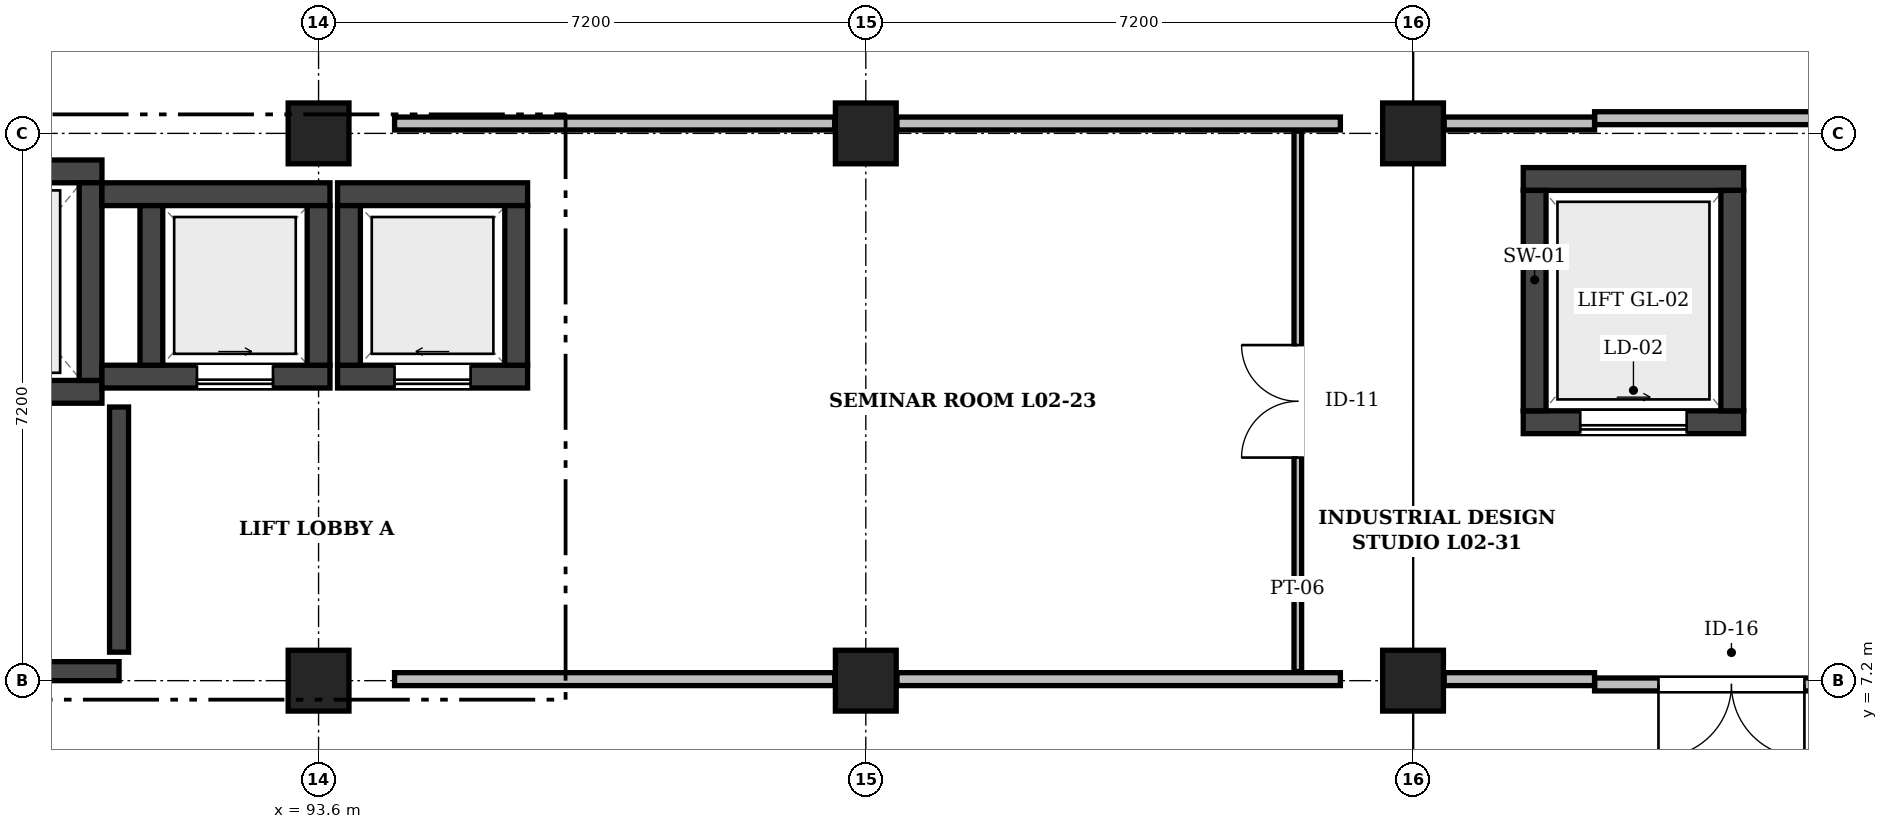
"""IFC4 building model, lengths in metres.
Left out: names, types, materials, properties, quantities, classifications, styles, units other than length and angle.
Written with IfcOpenShell. Run it as: python <this file> out.ifc"""

import sys

from ifc_helpers import new_model, si_unit, direction, frame, frame_2d, origin, origin_2d, place, context, subcontext, project, spatial, rectangle, extrude, element, fill, save


model = new_model("IFC4")
c1 = context("Model", 3, precision=1e-05, world=origin(), true_north=direction((0.0, 1.0)))
c2 = subcontext(c1, "Body", "Model", "MODEL_VIEW")
j1 = project(units=[si_unit("LENGTHUNIT", "METRE"), si_unit("PLANEANGLEUNIT", "RADIAN")], contexts=[c1])
p1 = place(None, origin())
s1 = spatial("IfcSite", under=j1, at=p1, CompositionType="ELEMENT")
p2 = place(p1, origin())
s2 = spatial("IfcBuilding", under=s1, at=p2, CompositionType="ELEMENT")
p3 = place(p2, frame((0.0, 0.0, 9.6)))
s3 = spatial("IfcBuildingStorey", under=s2, at=p3, CompositionType="ELEMENT", Elevation=9.6)
for number, where, z_axis, x_axis in (
    (1, (93.6, 7.2, 0.0), (0.0, 0.0, 1.0), (1.0, 0.0, 0.0)),
    (2, (93.6, 14.4, 0.0), (0.0, 0.0, 1.0), (1.0, 0.0, 0.0)),
    (3, (100.8, 7.2, 0.0), (0.0, 0.0, 1.0), (1.0, 0.0, 0.0)),
    (4, (100.8, 14.4, 0.0), (0.0, 0.0, 1.0), (1.0, 0.0, 0.0)),
    (5, (108.0, 7.2, 0.0), (0.0, 0.0, 1.0), (1.0, 0.0, 0.0)),
    (6, (108.0, 14.4, 0.0), (0.0, 0.0, 1.0), (1.0, 0.0, 0.0)),
):
    element("IfcColumn", number, at=place(p3, frame(where, z_axis=z_axis, x_axis=x_axis)), inside=s3, PredefinedType="COLUMN", context=c2, shape_type="SweptSolid", body=[
        extrude(rectangle(XDim=0.8, YDim=0.8, at=origin_2d()), origin(), (0.0, 0.0, 1.0), 4.8),
    ])
p4 = place(p3, frame((88.05, 11.0, 0.0), z_axis=(0.0, 0.0, 1.0), x_axis=(1.0, 0.0, 0.0)))
e7 = element("IfcWall", 7, at=p4, inside=s3, PredefinedType="SHEAR", context=c2, shape_type="SweptSolid", body=[
    extrude(rectangle(XDim=2.7, YDim=0.3, at=frame_2d((1.35, 0.0))), origin(), (0.0, 0.0, 1.0), 4.55),
])
p5 = place(p4, frame((0.85, 0.0, 0.0)))
e8 = element("IfcOpeningElement", 8, at=p5, cuts=e7, PredefinedType="OPENING", context=c2, shape_type="SweptSolid", body=[
    extrude(rectangle(XDim=1.0, YDim=2.1, at=frame_2d((0.5, 1.05))), frame((0.0, 0.162, 0.0), z_axis=(0.0, -1.0, 0.0), x_axis=(1.0, 0.0, 0.0)), (0.0, 0.0, 1.0), 0.324),
])
p6 = place(p3, frame((88.05, 13.9, 0.0), z_axis=(0.0, 0.0, 1.0), x_axis=(1.0, 0.0, 0.0)))
e9 = element("IfcWall", 9, at=p6, inside=s3, PredefinedType="SHEAR", context=c2, shape_type="SweptSolid", body=[
    extrude(rectangle(XDim=2.7, YDim=0.3, at=frame_2d((1.35, 0.0))), origin(), (0.0, 0.0, 1.0), 4.55),
])
p7 = place(p3, frame((90.6, 11.15, 0.0), z_axis=(0.0, 0.0, 1.0), x_axis=(0.0, 1.0, 0.0)))
e10 = element("IfcWall", 10, at=p7, inside=s3, PredefinedType="SHEAR", context=c2, shape_type="SweptSolid", body=[
    extrude(rectangle(XDim=2.6, YDim=0.3, at=frame_2d((1.3, 0.0))), origin(), (0.0, 0.0, 1.0), 4.55),
])
p8 = place(p3, frame((90.75, 11.2, 0.0), z_axis=(0.0, 0.0, 1.0), x_axis=(1.0, 0.0, 0.0)))
e11 = element("IfcWall", 11, at=p8, inside=s3, PredefinedType="SHEAR", context=c2, shape_type="SweptSolid", body=[
    extrude(rectangle(XDim=3.0, YDim=0.3, at=frame_2d((1.5, 0.0))), origin(), (0.0, 0.0, 1.0), 4.55),
])
p9 = place(p8, frame((1.25, 0.0, 0.0)))
e12 = element("IfcOpeningElement", 12, at=p9, cuts=e11, PredefinedType="OPENING", context=c2, shape_type="SweptSolid", body=[
    extrude(rectangle(XDim=1.0, YDim=2.1, at=frame_2d((0.5, 1.05))), frame((0.0, 0.162, 0.0), z_axis=(0.0, -1.0, 0.0), x_axis=(1.0, 0.0, 0.0)), (0.0, 0.0, 1.0), 0.324),
])
p10 = place(p3, frame((90.75, 13.6, 0.0), z_axis=(0.0, 0.0, 1.0), x_axis=(1.0, 0.0, 0.0)))
e13 = element("IfcWall", 13, at=p10, inside=s3, PredefinedType="SHEAR", context=c2, shape_type="SweptSolid", body=[
    extrude(rectangle(XDim=3.0, YDim=0.3, at=frame_2d((1.5, 0.0))), origin(), (0.0, 0.0, 1.0), 4.55),
])
for number, where, z_axis, x_axis in (
    (14, (91.4, 11.35, 0.0), (0.0, 0.0, 1.0), (0.0, 1.0, 0.0)),
    (15, (93.6, 11.35, 0.0), (0.0, 0.0, 1.0), (0.0, 1.0, 0.0)),
):
    element("IfcWall", number, at=place(p3, frame(where, z_axis=z_axis, x_axis=x_axis)), inside=s3, PredefinedType="SHEAR", context=c2, shape_type="SweptSolid", body=[
        extrude(rectangle(XDim=2.1, YDim=0.3, at=frame_2d((1.05, 0.0))), origin(), (0.0, 0.0, 1.0), 4.55),
    ])
p11 = place(p3, frame((93.85, 11.2, 0.0), z_axis=(0.0, 0.0, 1.0), x_axis=(1.0, 0.0, 0.0)))
e16 = element("IfcWall", 16, at=p11, inside=s3, PredefinedType="SHEAR", context=c2, shape_type="SweptSolid", body=[
    extrude(rectangle(XDim=2.5, YDim=0.3, at=frame_2d((1.25, 0.0))), origin(), (0.0, 0.0, 1.0), 4.55),
])
p12 = place(p11, frame((0.75, 0.0, 0.0)))
e17 = element("IfcOpeningElement", 17, at=p12, cuts=e16, PredefinedType="OPENING", context=c2, shape_type="SweptSolid", body=[
    extrude(rectangle(XDim=1.0, YDim=2.1, at=frame_2d((0.5, 1.05))), frame((0.0, 0.162, 0.0), z_axis=(0.0, -1.0, 0.0), x_axis=(1.0, 0.0, 0.0)), (0.0, 0.0, 1.0), 0.324),
])
p13 = place(p3, frame((93.85, 13.6, 0.0), z_axis=(0.0, 0.0, 1.0), x_axis=(1.0, 0.0, 0.0)))
e18 = element("IfcWall", 18, at=p13, inside=s3, PredefinedType="SHEAR", context=c2, shape_type="SweptSolid", body=[
    extrude(rectangle(XDim=2.5, YDim=0.3, at=frame_2d((1.25, 0.0))), origin(), (0.0, 0.0, 1.0), 4.55),
])
for number, where, z_axis, x_axis in (
    (19, (94.0, 11.35, 0.0), (0.0, 0.0, 1.0), (0.0, 1.0, 0.0)),
    (20, (96.2, 11.35, 0.0), (0.0, 0.0, 1.0), (0.0, 1.0, 0.0)),
):
    element("IfcWall", number, at=place(p3, frame(where, z_axis=z_axis, x_axis=x_axis)), inside=s3, PredefinedType="SHEAR", context=c2, shape_type="SweptSolid", body=[
        extrude(rectangle(XDim=2.1, YDim=0.3, at=frame_2d((1.05, 0.0))), origin(), (0.0, 0.0, 1.0), 4.55),
    ])
p14 = place(p3, frame((109.45, 10.6, 0.0), z_axis=(0.0, 0.0, 1.0), x_axis=(1.0, 0.0, 0.0)))
e21 = element("IfcWall", 21, at=p14, inside=s3, PredefinedType="SHEAR", context=c2, shape_type="SweptSolid", body=[
    extrude(rectangle(XDim=2.9, YDim=0.3, at=frame_2d((1.45, 0.0))), origin(), (0.0, 0.0, 1.0), 4.55),
])
p15 = place(p14, frame((0.75, 0.0, 0.0)))
e22 = element("IfcOpeningElement", 22, at=p15, cuts=e21, PredefinedType="OPENING", context=c2, shape_type="SweptSolid", body=[
    extrude(rectangle(XDim=1.4, YDim=2.2, at=frame_2d((0.7, 1.1))), frame((0.0, 0.162, 0.0), z_axis=(0.0, -1.0, 0.0), x_axis=(1.0, 0.0, 0.0)), (0.0, 0.0, 1.0), 0.324),
])
p16 = place(p3, frame((109.45, 13.8, 0.0), z_axis=(0.0, 0.0, 1.0), x_axis=(1.0, 0.0, 0.0)))
e23 = element("IfcWall", 23, at=p16, inside=s3, PredefinedType="SHEAR", context=c2, shape_type="SweptSolid", body=[
    extrude(rectangle(XDim=2.9, YDim=0.3, at=frame_2d((1.45, 0.0))), origin(), (0.0, 0.0, 1.0), 4.55),
])
for number, where, z_axis, x_axis in (
    (24, (109.6, 10.75, 0.0), (0.0, 0.0, 1.0), (0.0, 1.0, 0.0)),
    (25, (112.2, 10.75, 0.0), (0.0, 0.0, 1.0), (0.0, 1.0, 0.0)),
):
    element("IfcWall", number, at=place(p3, frame(where, z_axis=z_axis, x_axis=x_axis)), inside=s3, PredefinedType="SHEAR", context=c2, shape_type="SweptSolid", body=[
        extrude(rectangle(XDim=2.9, YDim=0.3, at=frame_2d((1.45, 0.0))), origin(), (0.0, 0.0, 1.0), 4.55),
    ])
p17 = place(p3, frame((86.8, 7.325, 0.0), z_axis=(0.0, 0.0, 1.0), x_axis=(1.0, 0.0, 0.0)))
e26 = element("IfcWall", 26, at=p17, inside=s3, PredefinedType="SHEAR", context=c2, shape_type="SweptSolid", body=[
    extrude(rectangle(XDim=4.175, YDim=0.25, at=frame_2d((2.087, 0.0))), origin(), (0.0, 0.0, 1.0), 4.55),
])
p18 = place(p17, frame((1.675, 0.0, 0.0)))
e27 = element("IfcOpeningElement", 27, at=p18, cuts=e26, PredefinedType="OPENING", context=c2, shape_type="SweptSolid", body=[
    extrude(rectangle(XDim=1.15, YDim=2.15, at=frame_2d((0.575, 1.075))), frame((0.0, 0.137, 0.0), z_axis=(0.0, -1.0, 0.0), x_axis=(1.0, 0.0, 0.0)), (0.0, 0.0, 1.0), 0.274),
])
p19 = place(p3, frame((90.975, 7.575, 0.0), z_axis=(0.0, 0.0, 1.0), x_axis=(0.0, 1.0, 0.0)))
e28 = element("IfcWall", 28, at=p19, inside=s3, PredefinedType="SHEAR", context=c2, shape_type="SweptSolid", body=[
    extrude(rectangle(XDim=3.225, YDim=0.25, at=frame_2d((1.613, 0.0))), origin(), (0.0, 0.0, 1.0), 4.55),
])
p20 = place(p3, frame((101.21, 14.53, 0.0), z_axis=(0.0, 0.0, 1.0), x_axis=(1.0, 0.0, 0.0)))
e29 = element("IfcWall", 29, at=p20, inside=s3, PredefinedType="PARTITIONING", context=c2, shape_type="SweptSolid", body=[
    extrude(rectangle(XDim=5.834, YDim=0.17, at=frame_2d((2.917, 0.0))), origin(), (0.0, 0.0, 1.0), 3.93),
])
p21 = place(p3, frame((94.6, 14.53, 0.0), z_axis=(0.0, 0.0, 1.0), x_axis=(1.0, 0.0, 0.0)))
e30 = element("IfcWall", 30, at=p21, inside=s3, PredefinedType="PARTITIONING", context=c2, shape_type="SweptSolid", body=[
    extrude(rectangle(XDim=5.79, YDim=0.17, at=frame_2d((2.895, 0.0))), origin(), (0.0, 0.0, 1.0), 3.93),
])
p22 = place(p3, frame((110.388, 14.6, 0.0), z_axis=(0.0, 0.0, 1.0), x_axis=(1.0, 0.0, 0.0)))
e31 = element("IfcWall", 31, at=p22, inside=s3, PredefinedType="PARTITIONING", context=c2, shape_type="SweptSolid", body=[
    extrude(rectangle(XDim=4.402, YDim=0.17, at=frame_2d((2.201, 0.0))), origin(), (0.0, 0.0, 1.0), 3.93),
])
p23 = place(p3, frame((108.41, 14.53, 0.0), z_axis=(0.0, 0.0, 1.0), x_axis=(1.0, 0.0, 0.0)))
e32 = element("IfcWall", 32, at=p23, inside=s3, PredefinedType="PARTITIONING", context=c2, shape_type="SweptSolid", body=[
    extrude(rectangle(XDim=1.979, YDim=0.17, at=frame_2d((0.989, 0.0))), origin(), (0.0, 0.0, 1.0), 3.93),
])
p24 = place(p3, frame((101.21, 7.22, 0.0), z_axis=(0.0, 0.0, 1.0), x_axis=(1.0, 0.0, 0.0)))
e33 = element("IfcWall", 33, at=p24, inside=s3, PredefinedType="PARTITIONING", context=c2, shape_type="SweptSolid", body=[
    extrude(rectangle(XDim=5.834, YDim=0.17, at=frame_2d((2.917, 0.0))), origin(), (0.0, 0.0, 1.0), 3.93),
])
p25 = place(p3, frame((94.6, 7.22, 0.0), z_axis=(0.0, 0.0, 1.0), x_axis=(1.0, 0.0, 0.0)))
e34 = element("IfcWall", 34, at=p25, inside=s3, PredefinedType="PARTITIONING", context=c2, shape_type="SweptSolid", body=[
    extrude(rectangle(XDim=5.79, YDim=0.17, at=frame_2d((2.895, 0.0))), origin(), (0.0, 0.0, 1.0), 3.93),
])
p26 = place(p3, frame((110.388, 7.15, 0.0), z_axis=(0.0, 0.0, 1.0), x_axis=(1.0, 0.0, 0.0)))
e35 = element("IfcWall", 35, at=p26, inside=s3, PredefinedType="PARTITIONING", context=c2, shape_type="SweptSolid", body=[
    extrude(rectangle(XDim=4.402, YDim=0.17, at=frame_2d((2.201, 0.0))), origin(), (0.0, 0.0, 1.0), 3.93),
])
p27 = place(p26, frame((0.841, 0.0, 0.0)))
e36 = element("IfcOpeningElement", 36, at=p27, cuts=e35, PredefinedType="OPENING", context=c2, shape_type="SweptSolid", body=[
    extrude(rectangle(XDim=1.92, YDim=2.32, at=frame_2d((0.96, 1.16))), frame((0.0, 0.097, 0.0), z_axis=(0.0, -1.0, 0.0), x_axis=(1.0, 0.0, 0.0)), (0.0, 0.0, 1.0), 0.194),
])
p28 = place(p3, frame((108.41, 7.22, 0.0), z_axis=(0.0, 0.0, 1.0), x_axis=(1.0, 0.0, 0.0)))
e37 = element("IfcWall", 37, at=p28, inside=s3, PredefinedType="PARTITIONING", context=c2, shape_type="SweptSolid", body=[
    extrude(rectangle(XDim=1.979, YDim=0.17, at=frame_2d((0.989, 0.0))), origin(), (0.0, 0.0, 1.0), 3.93),
])
p29 = place(p3, frame((106.484, 7.32, 0.0), z_axis=(0.0, 0.0, 1.0), x_axis=(0.0, 1.0, 0.0)))
e38 = element("IfcWall", 38, at=p29, inside=s3, PredefinedType="PARTITIONING", context=c2, shape_type="SweptSolid", body=[
    extrude(rectangle(XDim=7.11, YDim=0.1, at=frame_2d((3.555, 0.0))), origin(), (0.0, 0.0, 1.0), 4.46),
])
p30 = place(p29, frame((2.815, 0.0, 0.0)))
e39 = element("IfcOpeningElement", 39, at=p30, cuts=e38, PredefinedType="OPENING", context=c2, shape_type="SweptSolid", body=[
    extrude(rectangle(XDim=1.48, YDim=2.26, at=frame_2d((0.74, 1.13))), frame((0.0, 0.062, 0.0), z_axis=(0.0, -1.0, 0.0), x_axis=(1.0, 0.0, 0.0)), (0.0, 0.0, 1.0), 0.124),
])
p31 = place(p9, frame((1.0, 0.0, 0.0), z_axis=(0.0, 0.0, 1.0), x_axis=(-1.0, 0.0, 0.0)))
e40 = element("IfcDoor", 40, at=p31, inside=s3, OperationType="SLIDING_TO_RIGHT", PredefinedType="DOOR", context=c2, shape_type="SweptSolid", body=[
    extrude(rectangle(XDim=1.0, YDim=2.1, at=frame_2d((0.5, 1.05))), frame((0.0, 0.025, 0.0), z_axis=(0.0, -1.0, 0.0), x_axis=(1.0, 0.0, 0.0)), (0.0, 0.0, 1.0), 0.05),
])
fill(e12, e40)
p32 = place(p12, frame((1.0, 0.0, 0.0), z_axis=(0.0, 0.0, 1.0), x_axis=(-1.0, 0.0, 0.0)))
e41 = element("IfcDoor", 41, at=p32, inside=s3, OperationType="SLIDING_TO_LEFT", PredefinedType="DOOR", context=c2, shape_type="SweptSolid", body=[
    extrude(rectangle(XDim=1.0, YDim=2.1, at=frame_2d((0.5, 1.05))), frame((0.0, 0.025, 0.0), z_axis=(0.0, -1.0, 0.0), x_axis=(1.0, 0.0, 0.0)), (0.0, 0.0, 1.0), 0.05),
])
fill(e17, e41)
p33 = place(p15, frame((1.4, 0.0, 0.0), z_axis=(0.0, 0.0, 1.0), x_axis=(-1.0, 0.0, 0.0)))
e42 = element("IfcDoor", 42, at=p33, inside=s3, OperationType="SLIDING_TO_RIGHT", PredefinedType="DOOR", context=c2, shape_type="SweptSolid", body=[
    extrude(rectangle(XDim=1.4, YDim=2.2, at=frame_2d((0.7, 1.1))), frame((0.0, 0.025, 0.0), z_axis=(0.0, -1.0, 0.0), x_axis=(1.0, 0.0, 0.0)), (0.0, 0.0, 1.0), 0.05),
])
fill(e22, e42)
p34 = place(p27, frame((1.92, 0.0, 0.0), z_axis=(0.0, 0.0, 1.0), x_axis=(-1.0, 0.0, 0.0)))
e43 = element("IfcDoor", 43, at=p34, inside=s3, OperationType="DOUBLE_DOOR_SINGLE_SWING", PredefinedType="DOOR", context=c2, shape_type="SweptSolid", body=[
    extrude(rectangle(XDim=1.92, YDim=2.32, at=frame_2d((0.96, 1.16))), frame((0.0, 0.025, 0.0), z_axis=(0.0, -1.0, 0.0), x_axis=(1.0, 0.0, 0.0)), (0.0, 0.0, 1.0), 0.05),
])
fill(e36, e43)
p35 = place(p30, origin())
e44 = element("IfcDoor", 44, at=p35, inside=s3, OperationType="DOUBLE_DOOR_SINGLE_SWING", PredefinedType="DOOR", context=c2, shape_type="SweptSolid", body=[
    extrude(rectangle(XDim=1.48, YDim=2.26, at=frame_2d((0.74, 1.13))), frame((0.0, 0.025, 0.0), z_axis=(0.0, -1.0, 0.0), x_axis=(1.0, 0.0, 0.0)), (0.0, 0.0, 1.0), 0.05),
])
fill(e39, e44)
save(model, sys.argv[1])
